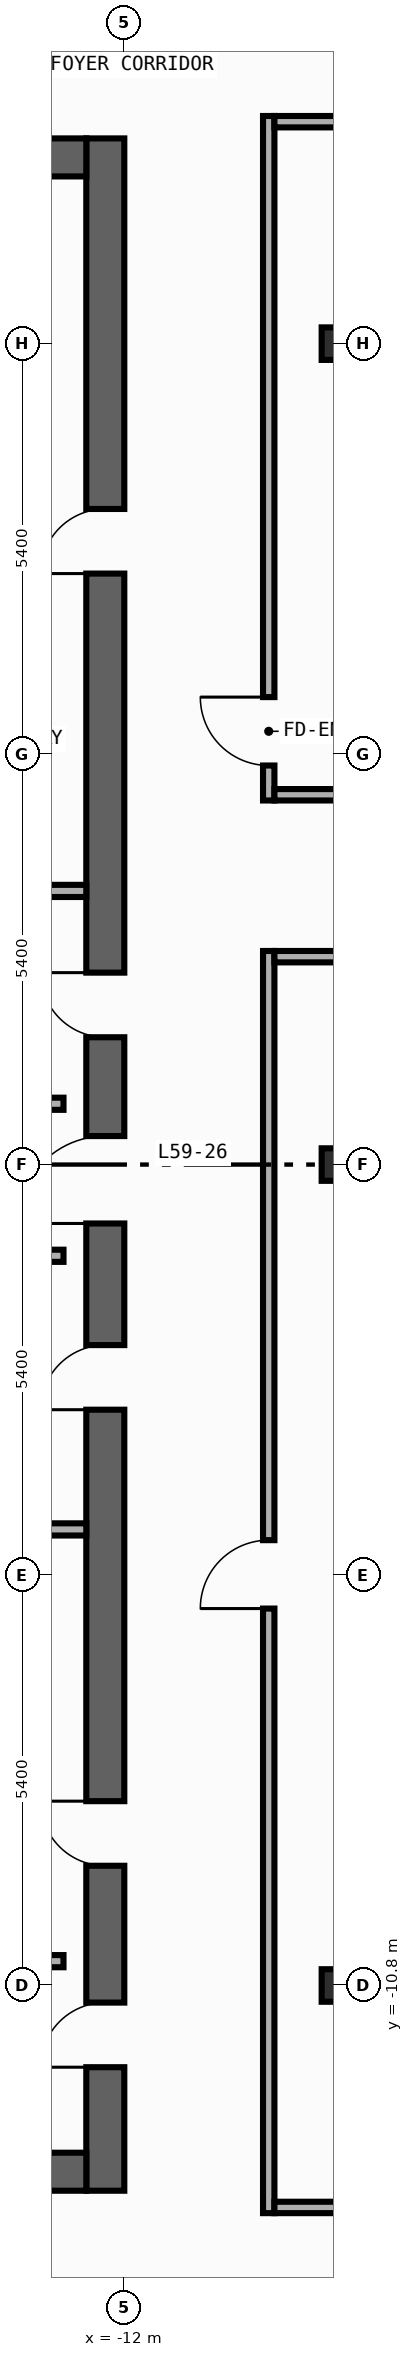
"""IFC4 building model, lengths in metres.
Left out: names, types, materials, properties, quantities, classifications, styles, units other than length and angle.
Written with IfcOpenShell. Run it as: python <this file> out.ifc"""

import sys

from ifc_helpers import new_model, si_unit, direction, frame, frame_2d, origin, origin_2d, place, context, subcontext, project, spatial, rectangle, i_section, extrude, element, fill, save


model = new_model("IFC4")
c1 = context("Model", 3, precision=1e-05, world=origin(), true_north=direction((0.0, 1.0)))
c2 = subcontext(c1, "Body", "Model", "MODEL_VIEW")
j1 = project(units=[si_unit("LENGTHUNIT", "METRE"), si_unit("PLANEANGLEUNIT", "RADIAN")], contexts=[c1])
p1 = place(None, origin())
s1 = spatial("IfcSite", under=j1, at=p1, CompositionType="ELEMENT")
p2 = place(p1, origin())
s2 = spatial("IfcBuilding", under=s1, at=p2, CompositionType="ELEMENT")
p3 = place(p2, frame((0.0, 0.0, 251.2)))
s3 = spatial("IfcBuildingStorey", under=s2, at=p3, CompositionType="ELEMENT", Elevation=251.2)
p4 = place(p3, frame((-12.25, -13.5, 0.0), z_axis=(0.0, 0.0, 1.0), x_axis=(0.0, 1.0, 0.0)))
e1 = element("IfcWall", 1, at=p4, inside=s3, PredefinedType="SHEAR", context=c2, shape_type="SweptSolid", body=[
    extrude(rectangle(XDim=27.0, YDim=0.5, at=frame_2d((13.5, 0.0))), origin(), (0.0, 0.0, 1.0), 3.34),
])
p5 = place(p4, frame((15.175, 0.0, 0.0)))
e2 = element("IfcOpeningElement", 2, at=p5, cuts=e1, PredefinedType="OPENING", context=c2, shape_type="SweptSolid", body=[
    extrude(rectangle(XDim=0.85, YDim=2.1, at=frame_2d((0.425, 1.05))), frame((0.0, 0.26, 0.0), z_axis=(0.0, -1.0, 0.0), x_axis=(1.0, 0.0, 0.0)), (0.0, 0.0, 1.0), 0.52),
])
p6 = place(p4, frame((21.275, 0.0, 0.0)))
e3 = element("IfcOpeningElement", 3, at=p6, cuts=e1, PredefinedType="OPENING", context=c2, shape_type="SweptSolid", body=[
    extrude(rectangle(XDim=0.85, YDim=2.1, at=frame_2d((0.425, 1.05))), frame((0.0, 0.26, 0.0), z_axis=(0.0, -1.0, 0.0), x_axis=(1.0, 0.0, 0.0)), (0.0, 0.0, 1.0), 0.52),
])
p7 = place(p4, frame((4.275, 0.0, 0.0)))
e4 = element("IfcOpeningElement", 4, at=p7, cuts=e1, PredefinedType="OPENING", context=c2, shape_type="SweptSolid", body=[
    extrude(rectangle(XDim=0.85, YDim=2.1, at=frame_2d((0.425, 1.05))), frame((0.0, 0.26, 0.0), z_axis=(0.0, -1.0, 0.0), x_axis=(1.0, 0.0, 0.0)), (0.0, 0.0, 1.0), 0.52),
])
p8 = place(p4, frame((10.275, 0.0, 0.0)))
e5 = element("IfcOpeningElement", 5, at=p8, cuts=e1, PredefinedType="OPENING", context=c2, shape_type="SweptSolid", body=[
    extrude(rectangle(XDim=0.85, YDim=2.1, at=frame_2d((0.425, 1.05))), frame((0.0, 0.26, 0.0), z_axis=(0.0, -1.0, 0.0), x_axis=(1.0, 0.0, 0.0)), (0.0, 0.0, 1.0), 0.52),
])
p9 = place(p4, frame((12.725, 0.0, 0.0)))
e6 = element("IfcOpeningElement", 6, at=p9, cuts=e1, PredefinedType="OPENING", context=c2, shape_type="SweptSolid", body=[
    extrude(rectangle(XDim=1.15, YDim=2.2, at=frame_2d((0.575, 1.1))), frame((0.0, 0.26, 0.0), z_axis=(0.0, -1.0, 0.0), x_axis=(1.0, 0.0, 0.0)), (0.0, 0.0, 1.0), 0.52),
])
p10 = place(p4, frame((1.625, 0.0, 0.0)))
e7 = element("IfcOpeningElement", 7, at=p10, cuts=e1, PredefinedType="OPENING", context=c2, shape_type="SweptSolid", body=[
    extrude(rectangle(XDim=0.85, YDim=2.1, at=frame_2d((0.425, 1.05))), frame((0.0, 0.26, 0.0), z_axis=(0.0, -1.0, 0.0), x_axis=(1.0, 0.0, 0.0)), (0.0, 0.0, 1.0), 0.52),
])
for number, where, z_axis, x_axis in (
    (8, (-19.9, -13.25, 0.0), (0.0, 0.0, 1.0), (1.0, 0.0, 0.0)),
    (9, (-19.9, 13.25, 0.0), (0.0, 0.0, 1.0), (1.0, 0.0, 0.0)),
):
    element("IfcWall", number, at=place(p3, frame(where, z_axis=z_axis, x_axis=x_axis)), inside=s3, PredefinedType="SHEAR", context=c2, shape_type="SweptSolid", body=[
        extrude(rectangle(XDim=7.4, YDim=0.5, at=frame_2d((3.7, 0.0))), origin(), (0.0, 0.0, 1.0), 3.34),
    ])
for number, where, z_axis, x_axis in (
    (10, (-9.2, -10.8, 0.0), (0.0, 0.0, 1.0), (1.0, 0.0, 0.0)),
    (11, (-9.2, 0.0, 0.0), (0.0, 0.0, 1.0), (1.0, 0.0, 0.0)),
    (12, (-9.2, 10.8, 0.0), (0.0, 0.0, 1.0), (1.0, 0.0, 0.0)),
):
    element("IfcColumn", number, at=place(p3, frame(where, z_axis=z_axis, x_axis=x_axis)), inside=s3, PredefinedType="COLUMN", context=c2, shape_type="SweptSolid", body=[
        extrude(i_section(OverallWidth=0.407, OverallDepth=0.428, WebThickness=0.02, FlangeThickness=0.035, FilletRadius=0.022, at=origin_2d()), origin(), (0.0, 0.0, 1.0), 3.6),
    ])
for number, where, z_axis, x_axis in (
    (13, (-15.4, 0.8, 0.0), (0.0, 0.0, 1.0), (1.0, 0.0, 0.0)),
    (14, (-15.4, -1.2, 0.0), (0.0, 0.0, 1.0), (1.0, 0.0, 0.0)),
    (15, (-15.4, -10.48, 0.0), (0.0, 0.0, 1.0), (1.0, 0.0, 0.0)),
):
    element("IfcWall", number, at=place(p3, frame(where, z_axis=z_axis, x_axis=x_axis)), inside=s3, PredefinedType="STANDARD", context=c2, shape_type="SweptSolid", body=[
        extrude(rectangle(XDim=2.6, YDim=0.16, at=frame_2d((1.3, 0.0))), origin(), (0.0, 0.0, 1.0), 3.34),
    ])
for number, where, z_axis, x_axis in (
    (16, (-15.4, 3.6, 0.0), (0.0, 0.0, 1.0), (1.0, 0.0, 0.0)),
    (17, (-15.4, -4.8, 0.0), (0.0, 0.0, 1.0), (1.0, 0.0, 0.0)),
):
    element("IfcWall", number, at=place(p3, frame(where, z_axis=z_axis, x_axis=x_axis)), inside=s3, PredefinedType="PARTITIONING", context=c2, shape_type="SweptSolid", body=[
        extrude(rectangle(XDim=2.9, YDim=0.16, at=frame_2d((1.45, 0.0))), origin(), (0.0, 0.0, 1.0), 3.34),
    ])
p11 = place(p3, frame((-10.1, 4.79, 0.0), z_axis=(0.0, 0.0, 1.0), x_axis=(0.0, 1.0, 0.0)))
e18 = element("IfcWall", 18, at=p11, inside=s3, PredefinedType="PARTITIONING", context=c2, shape_type="SweptSolid", body=[
    extrude(rectangle(XDim=9.005, YDim=0.15, at=frame_2d((4.502, 0.0))), origin(), (0.0, 0.0, 1.0), 3.34),
])
p12 = place(p11, frame((0.46, 0.0, 0.0)))
e19 = element("IfcOpeningElement", 19, at=p12, cuts=e18, PredefinedType="OPENING", context=c2, shape_type="SweptSolid", body=[
    extrude(rectangle(XDim=0.9, YDim=2.15, at=frame_2d((0.45, 1.075))), frame((0.0, 0.085, 0.0), z_axis=(0.0, -1.0, 0.0), x_axis=(1.0, 0.0, 0.0)), (0.0, 0.0, 1.0), 0.17),
])
p13 = place(p3, frame((-10.1, -13.795, 0.0), z_axis=(0.0, 0.0, 1.0), x_axis=(0.0, 1.0, 0.0)))
e20 = element("IfcWall", 20, at=p13, inside=s3, PredefinedType="PARTITIONING", context=c2, shape_type="SweptSolid", body=[
    extrude(rectangle(XDim=16.605, YDim=0.15, at=frame_2d((8.302, 0.0))), origin(), (0.0, 0.0, 1.0), 3.34),
])
p14 = place(p13, frame((7.954, 0.0, 0.0)))
e21 = element("IfcOpeningElement", 21, at=p14, cuts=e20, PredefinedType="OPENING", context=c2, shape_type="SweptSolid", body=[
    extrude(rectangle(XDim=0.9, YDim=2.15, at=frame_2d((0.45, 1.075))), frame((0.0, 0.085, 0.0), z_axis=(0.0, -1.0, 0.0), x_axis=(1.0, 0.0, 0.0)), (0.0, 0.0, 1.0), 0.17),
])
p15 = place(p3, frame((-10.025, 4.865, 0.0), z_axis=(0.0, 0.0, 1.0), x_axis=(1.0, 0.0, 0.0)))
e22 = element("IfcWall", 22, at=p15, inside=s3, PredefinedType="PARTITIONING", context=c2, shape_type="SweptSolid", body=[
    extrude(rectangle(XDim=13.055, YDim=0.15, at=frame_2d((6.527, 0.0))), origin(), (0.0, 0.0, 1.0), 3.34),
])
p16 = place(p15, frame((9.488, 0.0, 0.0)))
e23 = element("IfcOpeningElement", 23, at=p16, cuts=e22, PredefinedType="OPENING", context=c2, shape_type="SweptSolid", body=[
    extrude(rectangle(XDim=0.9, YDim=2.15, at=frame_2d((0.45, 1.075))), frame((0.0, 0.085, 0.0), z_axis=(0.0, -1.0, 0.0), x_axis=(1.0, 0.0, 0.0)), (0.0, 0.0, 1.0), 0.17),
])
p17 = place(p3, frame((-10.025, 2.735, 0.0), z_axis=(0.0, 0.0, 1.0), x_axis=(1.0, 0.0, 0.0)))
e24 = element("IfcWall", 24, at=p17, inside=s3, PredefinedType="PARTITIONING", context=c2, shape_type="SweptSolid", body=[
    extrude(rectangle(XDim=13.035, YDim=0.15, at=frame_2d((6.518, 0.0))), origin(), (0.0, 0.0, 1.0), 3.34),
])
p18 = place(p17, frame((9.672, 0.0, 0.0)))
e25 = element("IfcOpeningElement", 25, at=p18, cuts=e24, PredefinedType="OPENING", context=c2, shape_type="SweptSolid", body=[
    extrude(rectangle(XDim=0.9, YDim=2.15, at=frame_2d((0.45, 1.075))), frame((0.0, 0.085, 0.0), z_axis=(0.0, -1.0, 0.0), x_axis=(1.0, 0.0, 0.0)), (0.0, 0.0, 1.0), 0.17),
])
p19 = place(p3, frame((-10.025, 13.72, 0.0), z_axis=(0.0, 0.0, 1.0), x_axis=(1.0, 0.0, 0.0)))
e26 = element("IfcWall", 26, at=p19, inside=s3, PredefinedType="PARTITIONING", context=c2, shape_type="SweptSolid", body=[
    extrude(rectangle(XDim=13.055, YDim=0.15, at=frame_2d((6.527, 0.0))), origin(), (0.0, 0.0, 1.0), 3.34),
])
p20 = place(p19, frame((7.281, 0.0, 0.0)))
e27 = element("IfcOpeningElement", 27, at=p20, cuts=e26, PredefinedType="OPENING", context=c2, shape_type="SweptSolid", body=[
    extrude(rectangle(XDim=0.9, YDim=2.15, at=frame_2d((0.45, 1.075))), frame((0.0, 0.085, 0.0), z_axis=(0.0, -1.0, 0.0), x_axis=(1.0, 0.0, 0.0)), (0.0, 0.0, 1.0), 0.17),
])
p21 = place(p3, frame((-10.025, -13.72, 0.0), z_axis=(0.0, 0.0, 1.0), x_axis=(1.0, 0.0, 0.0)))
e28 = element("IfcWall", 28, at=p21, inside=s3, PredefinedType="PARTITIONING", context=c2, shape_type="SweptSolid", body=[
    extrude(rectangle(XDim=12.885, YDim=0.15, at=frame_2d((6.442, 0.0))), origin(), (0.0, 0.0, 1.0), 3.34),
])
p22 = place(p21, frame((7.3, 0.0, 0.0)))
e29 = element("IfcOpeningElement", 29, at=p22, cuts=e28, PredefinedType="OPENING", context=c2, shape_type="SweptSolid", body=[
    extrude(rectangle(XDim=0.9, YDim=2.15, at=frame_2d((0.45, 1.075))), frame((0.0, 0.085, 0.0), z_axis=(0.0, -1.0, 0.0), x_axis=(1.0, 0.0, 0.0)), (0.0, 0.0, 1.0), 0.17),
])
p23 = place(p5, origin())
e30 = element("IfcDoor", 30, at=p23, inside=s3, OperationType="SINGLE_SWING_RIGHT", PredefinedType="DOOR", context=c2, shape_type="SweptSolid", body=[
    extrude(rectangle(XDim=0.85, YDim=2.1, at=frame_2d((0.425, 1.05))), frame((0.0, 0.025, 0.0), z_axis=(0.0, -1.0, 0.0), x_axis=(1.0, 0.0, 0.0)), (0.0, 0.0, 1.0), 0.05),
])
fill(e2, e30)
p24 = place(p6, origin())
e31 = element("IfcDoor", 31, at=p24, inside=s3, OperationType="SINGLE_SWING_LEFT", PredefinedType="DOOR", context=c2, shape_type="SweptSolid", body=[
    extrude(rectangle(XDim=0.85, YDim=2.1, at=frame_2d((0.425, 1.05))), frame((0.0, 0.025, 0.0), z_axis=(0.0, -1.0, 0.0), x_axis=(1.0, 0.0, 0.0)), (0.0, 0.0, 1.0), 0.05),
])
fill(e3, e31)
p25 = place(p7, origin())
e32 = element("IfcDoor", 32, at=p25, inside=s3, OperationType="SINGLE_SWING_RIGHT", PredefinedType="DOOR", context=c2, shape_type="SweptSolid", body=[
    extrude(rectangle(XDim=0.85, YDim=2.1, at=frame_2d((0.425, 1.05))), frame((0.0, 0.025, 0.0), z_axis=(0.0, -1.0, 0.0), x_axis=(1.0, 0.0, 0.0)), (0.0, 0.0, 1.0), 0.05),
])
fill(e4, e32)
p26 = place(p8, origin())
e33 = element("IfcDoor", 33, at=p26, inside=s3, OperationType="SINGLE_SWING_LEFT", PredefinedType="DOOR", context=c2, shape_type="SweptSolid", body=[
    extrude(rectangle(XDim=0.85, YDim=2.1, at=frame_2d((0.425, 1.05))), frame((0.0, 0.025, 0.0), z_axis=(0.0, -1.0, 0.0), x_axis=(1.0, 0.0, 0.0)), (0.0, 0.0, 1.0), 0.05),
])
fill(e5, e33)
p27 = place(p9, origin())
e34 = element("IfcDoor", 34, at=p27, inside=s3, OperationType="SINGLE_SWING_LEFT", PredefinedType="DOOR", context=c2, shape_type="SweptSolid", body=[
    extrude(rectangle(XDim=1.15, YDim=2.2, at=frame_2d((0.575, 1.1))), frame((0.0, 0.025, 0.0), z_axis=(0.0, -1.0, 0.0), x_axis=(1.0, 0.0, 0.0)), (0.0, 0.0, 1.0), 0.05),
])
fill(e6, e34)
p28 = place(p10, origin())
e35 = element("IfcDoor", 35, at=p28, inside=s3, OperationType="SINGLE_SWING_LEFT", PredefinedType="DOOR", context=c2, shape_type="SweptSolid", body=[
    extrude(rectangle(XDim=0.85, YDim=2.1, at=frame_2d((0.425, 1.05))), frame((0.0, 0.025, 0.0), z_axis=(0.0, -1.0, 0.0), x_axis=(1.0, 0.0, 0.0)), (0.0, 0.0, 1.0), 0.05),
])
fill(e7, e35)
p29 = place(p12, origin())
e36 = element("IfcDoor", 36, at=p29, inside=s3, OperationType="SINGLE_SWING_RIGHT", PredefinedType="DOOR", context=c2, shape_type="SweptSolid", body=[
    extrude(rectangle(XDim=0.9, YDim=2.15, at=frame_2d((0.45, 1.075))), frame((0.0, 0.025, 0.0), z_axis=(0.0, -1.0, 0.0), x_axis=(1.0, 0.0, 0.0)), (0.0, 0.0, 1.0), 0.05),
])
fill(e19, e36)
p30 = place(p14, origin())
e37 = element("IfcDoor", 37, at=p30, inside=s3, OperationType="SINGLE_SWING_LEFT", PredefinedType="DOOR", context=c2, shape_type="SweptSolid", body=[
    extrude(rectangle(XDim=0.9, YDim=2.15, at=frame_2d((0.45, 1.075))), frame((0.0, 0.025, 0.0), z_axis=(0.0, -1.0, 0.0), x_axis=(1.0, 0.0, 0.0)), (0.0, 0.0, 1.0), 0.05),
])
fill(e21, e37)
save(model, sys.argv[1])
